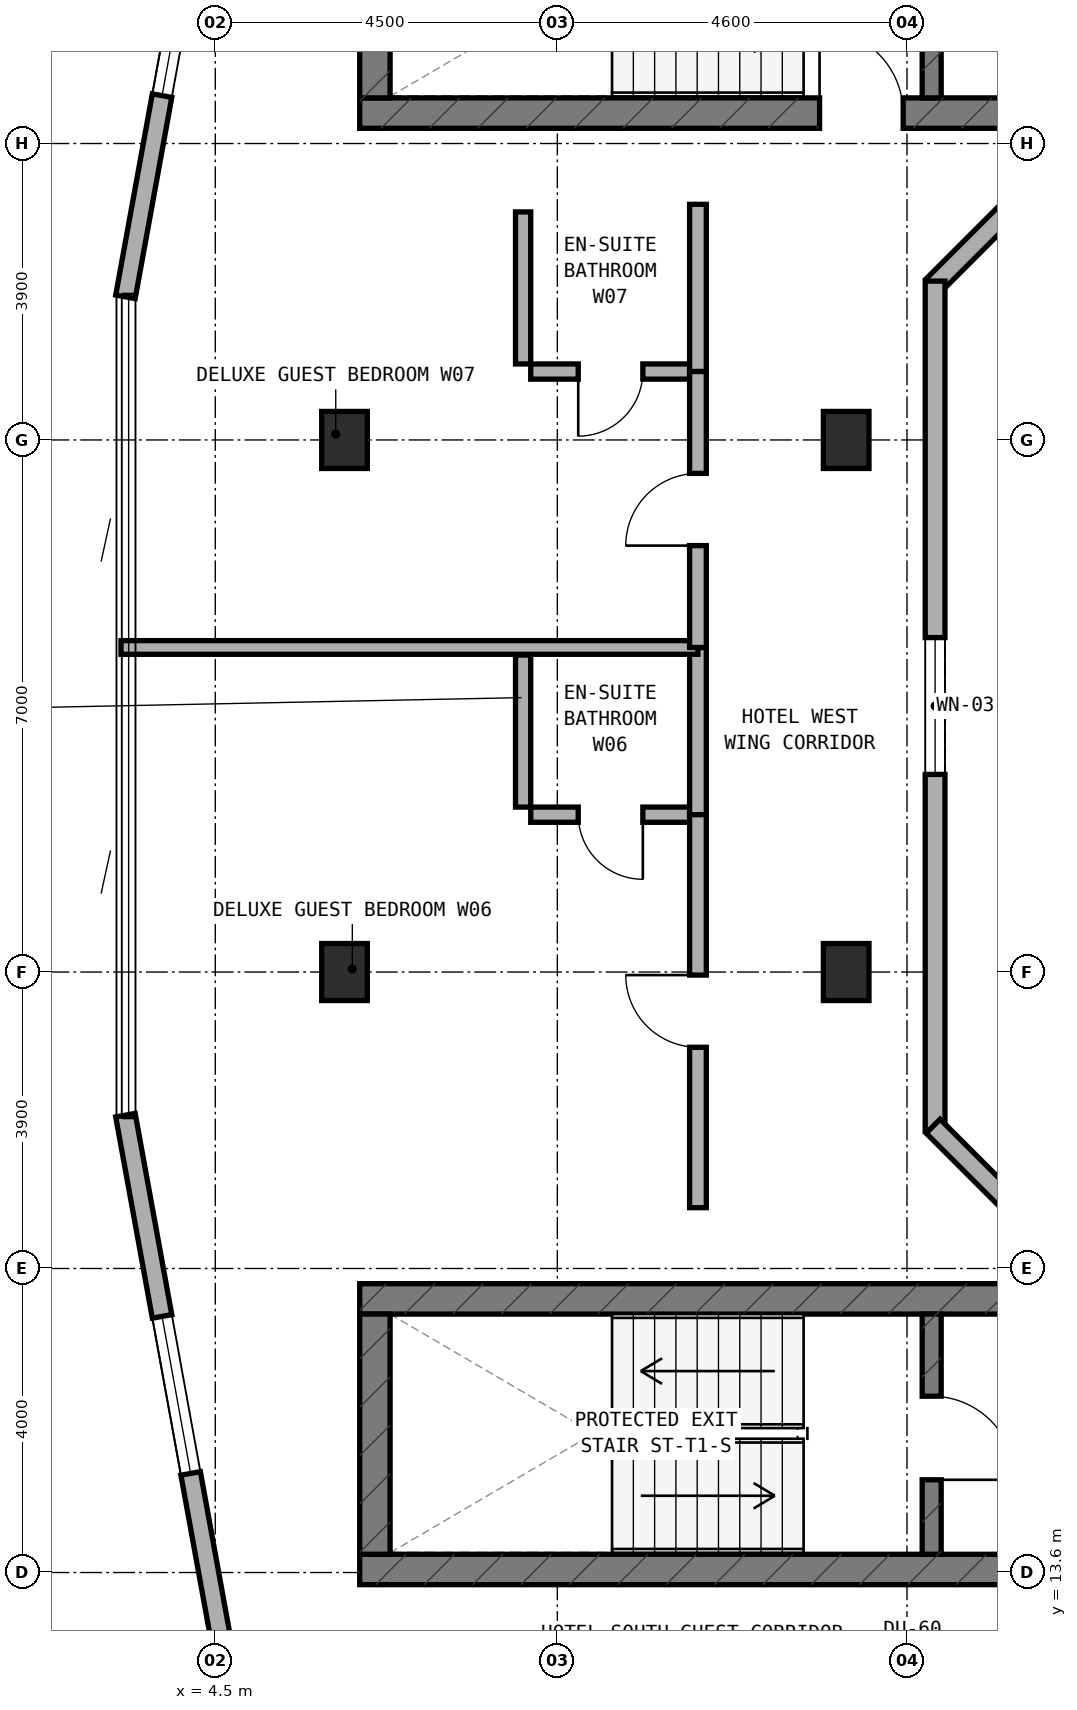
"""IFC4 building model, lengths in metres.
Left out: names, types, materials, properties, quantities, classifications, styles, units other than length and angle.
Written with IfcOpenShell. Run it as: python <this file> out.ifc"""

import sys

from ifc_helpers import new_model, si_unit, direction, frame, frame_2d, origin, origin_2d, place, context, subcontext, project, spatial, rectangle, extrude, element, fill, save


model = new_model("IFC4")
c1 = context("Model", 3, precision=1e-05, world=origin(), true_north=direction((0.0, 1.0)))
c2 = subcontext(c1, "Body", "Model", "MODEL_VIEW")
j1 = project(units=[si_unit("LENGTHUNIT", "METRE"), si_unit("PLANEANGLEUNIT", "RADIAN")], contexts=[c1])
p1 = place(None, origin())
s1 = spatial("IfcSite", under=j1, at=p1, CompositionType="ELEMENT")
p2 = place(p1, origin())
s2 = spatial("IfcBuilding", under=s1, at=p2, CompositionType="ELEMENT")
p3 = place(p2, frame((0.0, 0.0, 250.4)))
s3 = spatial("IfcBuildingStorey", under=s2, at=p3, CompositionType="ELEMENT", Elevation=250.4)
p4 = place(p3, frame((6.4, 32.8, 0.0), z_axis=(0.0, 0.0, 1.0), x_axis=(1.0, 0.0, 0.0)))
e1 = element("IfcWall", 1, at=p4, inside=s3, PredefinedType="SHEAR", context=c2, shape_type="SweptSolid", body=[
    extrude(rectangle(XDim=24.4, YDim=0.4, at=frame_2d((12.2, 0.0))), origin(), (0.0, 0.0, 1.0), 3.6),
])
p5 = place(p4, frame((6.05, 0.0, 0.0)))
e2 = element("IfcOpeningElement", 2, at=p5, cuts=e1, PredefinedType="OPENING", context=c2, shape_type="SweptSolid", body=[
    extrude(rectangle(XDim=1.1, YDim=2.15, at=frame_2d((0.55, 1.075))), frame((0.0, 0.21, 0.0), z_axis=(0.0, -1.0, 0.0), x_axis=(1.0, 0.0, 0.0)), (0.0, 0.0, 1.0), 0.42),
])
p6 = place(p3, frame((6.6, 33.0, 0.0), z_axis=(0.0, 0.0, 1.0), x_axis=(0.0, 1.0, 0.0)))
e3 = element("IfcWall", 3, at=p6, inside=s3, PredefinedType="SHEAR", context=c2, shape_type="SweptSolid", body=[
    extrude(rectangle(XDim=3.16, YDim=0.4, at=frame_2d((1.58, 0.0))), origin(), (0.0, 0.0, 1.0), 3.6),
])
p7 = place(p3, frame((13.925, 33.0, 0.0), z_axis=(0.0, 0.0, 1.0), x_axis=(0.0, 1.0, 0.0)))
e4 = element("IfcWall", 4, at=p7, inside=s3, PredefinedType="STANDARD", context=c2, shape_type="SweptSolid", body=[
    extrude(rectangle(XDim=3.16, YDim=0.25, at=frame_2d((1.58, 0.0))), origin(), (0.0, 0.0, 1.0), 3.32),
])
p8 = place(p7, frame((0.98, 0.0, 0.0)))
e5 = element("IfcOpeningElement", 5, at=p8, cuts=e4, PredefinedType="OPENING", context=c2, shape_type="SweptSolid", body=[
    extrude(rectangle(XDim=1.1, YDim=2.15, at=frame_2d((0.55, 1.075))), frame((0.0, 0.135, 0.0), z_axis=(0.0, -1.0, 0.0), x_axis=(1.0, 0.0, 0.0)), (0.0, 0.0, 1.0), 0.27),
])
p9 = place(p3, frame((6.4, 13.64, 0.0), z_axis=(0.0, 0.0, 1.0), x_axis=(1.0, 0.0, 0.0)))
e6 = element("IfcWall", 6, at=p9, inside=s3, PredefinedType="SHEAR", context=c2, shape_type="SweptSolid", body=[
    extrude(rectangle(XDim=24.4, YDim=0.4, at=frame_2d((12.2, 0.0))), origin(), (0.0, 0.0, 1.0), 3.6),
])
p10 = place(p9, frame((9.15, 0.0, 0.0)))
e7 = element("IfcOpeningElement", 7, at=p10, cuts=e6, PredefinedType="OPENING", context=c2, shape_type="SweptSolid", body=[
    extrude(rectangle(XDim=1.2, YDim=2.15, at=frame_2d((0.6, 1.075))), frame((0.0, 0.21, 0.0), z_axis=(0.0, -1.0, 0.0), x_axis=(1.0, 0.0, 0.0)), (0.0, 0.0, 1.0), 0.42),
])
p11 = place(p9, frame((16.94, 0.0, 0.0)))
e8 = element("IfcOpeningElement", 8, at=p11, cuts=e6, PredefinedType="OPENING", context=c2, shape_type="SweptSolid", body=[
    extrude(rectangle(XDim=0.85, YDim=2.1, at=frame_2d((0.425, 1.05))), frame((0.0, 0.21, 0.0), z_axis=(0.0, -1.0, 0.0), x_axis=(1.0, 0.0, 0.0)), (0.0, 0.0, 1.0), 0.42),
])
p12 = place(p9, frame((18.783, 0.0, 0.0)))
e9 = element("IfcOpeningElement", 9, at=p12, cuts=e6, PredefinedType="OPENING", context=c2, shape_type="SweptSolid", body=[
    extrude(rectangle(XDim=1.1, YDim=2.15, at=frame_2d((0.55, 1.075))), frame((0.0, 0.21, 0.0), z_axis=(0.0, -1.0, 0.0), x_axis=(1.0, 0.0, 0.0)), (0.0, 0.0, 1.0), 0.42),
])
p13 = place(p9, frame((20.65, 0.0, 0.0)))
e10 = element("IfcOpeningElement", 10, at=p13, cuts=e6, PredefinedType="OPENING", context=c2, shape_type="SweptSolid", body=[
    extrude(rectangle(XDim=1.1, YDim=2.15, at=frame_2d((0.55, 1.075))), frame((0.0, 0.21, 0.0), z_axis=(0.0, -1.0, 0.0), x_axis=(1.0, 0.0, 0.0)), (0.0, 0.0, 1.0), 0.42),
])
p14 = place(p9, frame((22.517, 0.0, 0.0)))
e11 = element("IfcOpeningElement", 11, at=p14, cuts=e6, PredefinedType="OPENING", context=c2, shape_type="SweptSolid", body=[
    extrude(rectangle(XDim=1.1, YDim=2.15, at=frame_2d((0.55, 1.075))), frame((0.0, 0.21, 0.0), z_axis=(0.0, -1.0, 0.0), x_axis=(1.0, 0.0, 0.0)), (0.0, 0.0, 1.0), 0.42),
])
p15 = place(p3, frame((6.4, 17.2, 0.0), z_axis=(0.0, 0.0, 1.0), x_axis=(1.0, 0.0, 0.0)))
e12 = element("IfcWall", 12, at=p15, inside=s3, PredefinedType="SHEAR", context=c2, shape_type="SweptSolid", body=[
    extrude(rectangle(XDim=24.4, YDim=0.4, at=frame_2d((12.2, 0.0))), origin(), (0.0, 0.0, 1.0), 3.6),
])
p16 = place(p3, frame((6.6, 13.84, 0.0), z_axis=(0.0, 0.0, 1.0), x_axis=(0.0, 1.0, 0.0)))
e13 = element("IfcWall", 13, at=p16, inside=s3, PredefinedType="SHEAR", context=c2, shape_type="SweptSolid", body=[
    extrude(rectangle(XDim=3.16, YDim=0.4, at=frame_2d((1.58, 0.0))), origin(), (0.0, 0.0, 1.0), 3.6),
])
p17 = place(p3, frame((13.925, 13.84, 0.0), z_axis=(0.0, 0.0, 1.0), x_axis=(0.0, 1.0, 0.0)))
e14 = element("IfcWall", 14, at=p17, inside=s3, PredefinedType="STANDARD", context=c2, shape_type="SweptSolid", body=[
    extrude(rectangle(XDim=3.16, YDim=0.25, at=frame_2d((1.58, 0.0))), origin(), (0.0, 0.0, 1.0), 3.32),
])
p18 = place(p17, frame((0.98, 0.0, 0.0)))
e15 = element("IfcOpeningElement", 15, at=p18, cuts=e14, PredefinedType="OPENING", context=c2, shape_type="SweptSolid", body=[
    extrude(rectangle(XDim=1.1, YDim=2.15, at=frame_2d((0.55, 1.075))), frame((0.0, 0.135, 0.0), z_axis=(0.0, -1.0, 0.0), x_axis=(1.0, 0.0, 0.0)), (0.0, 0.0, 1.0), 0.27),
])
for number, where, z_axis, x_axis in (
    (16, (6.2, 21.5, 0.0), (0.0, 0.0, 1.0), (1.0, 0.0, 0.0)),
    (17, (6.2, 28.5, 0.0), (0.0, 0.0, 1.0), (1.0, 0.0, 0.0)),
    (18, (12.8, 21.5, 0.0), (0.0, 0.0, 1.0), (1.0, 0.0, 0.0)),
    (19, (12.8, 28.5, 0.0), (0.0, 0.0, 1.0), (1.0, 0.0, 0.0)),
):
    element("IfcColumn", number, at=place(p3, frame(where, z_axis=z_axis, x_axis=x_axis)), inside=s3, PredefinedType="COLUMN", context=c2, shape_type="SweptSolid", body=[
        extrude(rectangle(XDim=0.6, YDim=0.75, at=origin_2d()), origin(), (0.0, 0.0, 1.0), 3.6),
    ])
p19 = place(p3, frame((4.829, 38.685, 0.0), z_axis=(0.0, 0.0, 1.0), x_axis=(-0.179061111398, -0.983837953316, 0.0)))
e20 = element("IfcWall", 20, at=p19, inside=s3, PredefinedType="STANDARD", context=c2, shape_type="SweptSolid", body=[
    extrude(rectangle(XDim=8.438, YDim=0.26, at=frame_2d((4.219, 0.0))), origin(), (0.0, 0.0, 1.0), 3.32),
])
p20 = place(p19, frame((3.648, 0.0, 0.85)))
e21 = element("IfcOpeningElement", 21, at=p20, cuts=e20, PredefinedType="OPENING", context=c2, shape_type="SweptSolid", body=[
    extrude(rectangle(XDim=2.1, YDim=1.5, at=frame_2d((1.05, 0.75))), frame((0.0, 0.14, 0.0), z_axis=(0.0, -1.0, 0.0), x_axis=(1.0, 0.0, 0.0)), (0.0, 0.0, 1.0), 0.28),
])
p21 = place(p3, frame((3.318, 19.617, 0.0), z_axis=(0.0, 0.0, 1.0), x_axis=(0.179061111398, -0.983837953316, 0.0)))
e22 = element("IfcWall", 22, at=p21, inside=s3, PredefinedType="STANDARD", context=c2, shape_type="SweptSolid", body=[
    extrude(rectangle(XDim=8.438, YDim=0.26, at=frame_2d((4.219, 0.0))), origin(), (0.0, 0.0, 1.0), 3.32),
])
p22 = place(p21, frame((2.691, 0.0, 0.85)))
e23 = element("IfcOpeningElement", 23, at=p22, cuts=e22, PredefinedType="OPENING", context=c2, shape_type="SweptSolid", body=[
    extrude(rectangle(XDim=2.1, YDim=1.5, at=frame_2d((1.05, 0.75))), frame((0.0, 0.14, 0.0), z_axis=(0.0, -1.0, 0.0), x_axis=(1.0, 0.0, 0.0)), (0.0, 0.0, 1.0), 0.28),
])
p23 = place(p3, frame((15.578, 32.162, 0.0), z_axis=(0.0, 0.0, 1.0), x_axis=(-0.707053950914, -0.707159607512, 0.0)))
e24 = element("IfcWall", 24, at=p23, inside=s3, PredefinedType="STANDARD", context=c2, shape_type="SweptSolid", body=[
    extrude(rectangle(XDim=2.311, YDim=0.26, at=frame_2d((1.155, 0.0))), origin(), (0.0, 0.0, 1.0), 3.32),
])
p24 = place(p3, frame((13.97, 30.59, 0.0), z_axis=(0.0, 0.0, 1.0), x_axis=(0.0, -1.0, 0.0)))
e25 = element("IfcWall", 25, at=p24, inside=s3, PredefinedType="STANDARD", context=c2, shape_type="SweptSolid", body=[
    extrude(rectangle(XDim=11.18, YDim=0.26, at=frame_2d((5.59, 0.0))), origin(), (0.0, 0.0, 1.0), 3.32),
])
p25 = place(p24, frame((4.69, 0.0, 0.85)))
e26 = element("IfcOpeningElement", 26, at=p25, cuts=e25, PredefinedType="OPENING", context=c2, shape_type="SweptSolid", body=[
    extrude(rectangle(XDim=1.8, YDim=1.5, at=frame_2d((0.9, 0.75))), frame((0.0, 0.14, 0.0), z_axis=(0.0, -1.0, 0.0), x_axis=(1.0, 0.0, 0.0)), (0.0, 0.0, 1.0), 0.28),
])
p26 = place(p3, frame((13.944, 19.472, 0.0), z_axis=(0.0, 0.0, 1.0), x_axis=(0.707053950914, -0.707159607512, 0.0)))
e27 = element("IfcWall", 27, at=p26, inside=s3, PredefinedType="STANDARD", context=c2, shape_type="SweptSolid", body=[
    extrude(rectangle(XDim=2.311, YDim=0.26, at=frame_2d((1.155, 0.0))), origin(), (0.0, 0.0, 1.0), 3.32),
])
p27 = place(p3, frame((8.65, 23.57, 0.0), z_axis=(0.0, 0.0, 1.0), x_axis=(1.0, 0.0, 0.0)))
e28 = element("IfcWall", 28, at=p27, inside=s3, PredefinedType="PLUMBINGWALL", context=c2, shape_type="SweptSolid", body=[
    extrude(rectangle(XDim=2.1, YDim=0.2, at=frame_2d((1.05, 0.0))), origin(), (0.0, 0.0, 1.0), 3.32),
])
p28 = place(p27, frame((0.625, 0.0, 0.0)))
e29 = element("IfcOpeningElement", 29, at=p28, cuts=e28, PredefinedType="OPENING", context=c2, shape_type="SweptSolid", body=[
    extrude(rectangle(XDim=0.85, YDim=2.1, at=frame_2d((0.425, 1.05))), frame((0.0, 0.11, 0.0), z_axis=(0.0, -1.0, 0.0), x_axis=(1.0, 0.0, 0.0)), (0.0, 0.0, 1.0), 0.22),
])
p29 = place(p3, frame((8.55, 23.67, 0.0), z_axis=(0.0, 0.0, 1.0), x_axis=(0.0, 1.0, 0.0)))
e30 = element("IfcWall", 30, at=p29, inside=s3, PredefinedType="PLUMBINGWALL", context=c2, shape_type="SweptSolid", body=[
    extrude(rectangle(XDim=2.0, YDim=0.2, at=frame_2d((1.0, 0.0))), origin(), (0.0, 0.0, 1.0), 3.32),
])
p30 = place(p3, frame((10.85, 23.57, 0.0), z_axis=(0.0, 0.0, 1.0), x_axis=(0.0, 1.0, 0.0)))
e31 = element("IfcWall", 31, at=p30, inside=s3, PredefinedType="SOLIDWALL", context=c2, shape_type="SweptSolid", body=[
    extrude(rectangle(XDim=2.2, YDim=0.22, at=frame_2d((1.1, 0.0))), origin(), (0.0, 0.0, 1.0), 3.32),
])
p31 = place(p3, frame((10.85, 18.4, 0.0), z_axis=(0.0, 0.0, 1.0), x_axis=(0.0, 1.0, 0.0)))
e32 = element("IfcWall", 32, at=p31, inside=s3, PredefinedType="SOLIDWALL", context=c2, shape_type="SweptSolid", body=[
    extrude(rectangle(XDim=5.17, YDim=0.22, at=frame_2d((2.585, 0.0))), origin(), (0.0, 0.0, 1.0), 2.745),
])
p32 = place(p31, frame((2.11, 0.0, 0.0)))
e33 = element("IfcOpeningElement", 33, at=p32, cuts=e32, PredefinedType="OPENING", context=c2, shape_type="SweptSolid", body=[
    extrude(rectangle(XDim=0.95, YDim=2.1, at=frame_2d((0.475, 1.05))), frame((0.0, 0.12, 0.0), z_axis=(0.0, -1.0, 0.0), x_axis=(1.0, 0.0, 0.0)), (0.0, 0.0, 1.0), 0.24),
])
p33 = place(p3, frame((3.26, 25.77, 0.0), z_axis=(0.0, 0.0, 1.0), x_axis=(1.0, 0.0, 0.0)))
e34 = element("IfcWall", 34, at=p33, inside=s3, PredefinedType="SOLIDWALL", context=c2, shape_type="SweptSolid", body=[
    extrude(rectangle(XDim=7.59, YDim=0.18, at=frame_2d((3.795, 0.0))), origin(), (0.0, 0.0, 1.0), 3.015),
])
p34 = place(p3, frame((8.65, 29.4, 0.0), z_axis=(0.0, 0.0, 1.0), x_axis=(1.0, 0.0, 0.0)))
e35 = element("IfcWall", 35, at=p34, inside=s3, PredefinedType="PLUMBINGWALL", context=c2, shape_type="SweptSolid", body=[
    extrude(rectangle(XDim=2.1, YDim=0.2, at=frame_2d((1.05, 0.0))), origin(), (0.0, 0.0, 1.0), 3.32),
])
p35 = place(p34, frame((0.625, 0.0, 0.0)))
e36 = element("IfcOpeningElement", 36, at=p35, cuts=e35, PredefinedType="OPENING", context=c2, shape_type="SweptSolid", body=[
    extrude(rectangle(XDim=0.85, YDim=2.1, at=frame_2d((0.425, 1.05))), frame((0.0, 0.11, 0.0), z_axis=(0.0, -1.0, 0.0), x_axis=(1.0, 0.0, 0.0)), (0.0, 0.0, 1.0), 0.22),
])
p36 = place(p3, frame((8.55, 29.5, 0.0), z_axis=(0.0, 0.0, 1.0), x_axis=(0.0, 1.0, 0.0)))
e37 = element("IfcWall", 37, at=p36, inside=s3, PredefinedType="PLUMBINGWALL", context=c2, shape_type="SweptSolid", body=[
    extrude(rectangle(XDim=2.0, YDim=0.2, at=frame_2d((1.0, 0.0))), origin(), (0.0, 0.0, 1.0), 3.32),
])
p37 = place(p3, frame((10.85, 29.4, 0.0), z_axis=(0.0, 0.0, 1.0), x_axis=(0.0, 1.0, 0.0)))
e38 = element("IfcWall", 38, at=p37, inside=s3, PredefinedType="SOLIDWALL", context=c2, shape_type="SweptSolid", body=[
    extrude(rectangle(XDim=2.2, YDim=0.22, at=frame_2d((1.1, 0.0))), origin(), (0.0, 0.0, 1.0), 3.32),
])
p38 = place(p3, frame((10.85, 25.77, 0.0), z_axis=(0.0, 0.0, 1.0), x_axis=(0.0, 1.0, 0.0)))
e39 = element("IfcWall", 39, at=p38, inside=s3, PredefinedType="SOLIDWALL", context=c2, shape_type="SweptSolid", body=[
    extrude(rectangle(XDim=3.63, YDim=0.22, at=frame_2d((1.815, 0.0))), origin(), (0.0, 0.0, 1.0), 2.745),
])
p39 = place(p38, frame((1.34, 0.0, 0.0)))
e40 = element("IfcOpeningElement", 40, at=p39, cuts=e39, PredefinedType="OPENING", context=c2, shape_type="SweptSolid", body=[
    extrude(rectangle(XDim=0.95, YDim=2.1, at=frame_2d((0.475, 1.05))), frame((0.0, 0.12, 0.0), z_axis=(0.0, -1.0, 0.0), x_axis=(1.0, 0.0, 0.0)), (0.0, 0.0, 1.0), 0.24),
])
p40 = place(p20, origin())
e41 = element("IfcWindow", 41, at=p40, inside=s3, PartitioningType="SINGLE_PANEL", PredefinedType="WINDOW", context=c2, shape_type="SweptSolid", body=[
    extrude(rectangle(XDim=2.1, YDim=1.5, at=frame_2d((1.05, 0.75))), frame((0.0, 0.03, 0.0), z_axis=(0.0, -1.0, 0.0), x_axis=(1.0, 0.0, 0.0)), (0.0, 0.0, 1.0), 0.06),
])
fill(e21, e41)
p41 = place(p22, origin())
e42 = element("IfcWindow", 42, at=p41, inside=s3, PartitioningType="SINGLE_PANEL", PredefinedType="WINDOW", context=c2, shape_type="SweptSolid", body=[
    extrude(rectangle(XDim=2.1, YDim=1.5, at=frame_2d((1.05, 0.75))), frame((0.0, 0.03, 0.0), z_axis=(0.0, -1.0, 0.0), x_axis=(1.0, 0.0, 0.0)), (0.0, 0.0, 1.0), 0.06),
])
fill(e23, e42)
p42 = place(p25, origin())
e43 = element("IfcWindow", 43, at=p42, inside=s3, PartitioningType="SINGLE_PANEL", PredefinedType="WINDOW", context=c2, shape_type="SweptSolid", body=[
    extrude(rectangle(XDim=1.8, YDim=1.5, at=frame_2d((0.9, 0.75))), frame((0.0, 0.03, 0.0), z_axis=(0.0, -1.0, 0.0), x_axis=(1.0, 0.0, 0.0)), (0.0, 0.0, 1.0), 0.06),
])
fill(e26, e43)
p43 = place(p18, frame((1.1, 0.0, 0.0), z_axis=(0.0, 0.0, 1.0), x_axis=(-1.0, 0.0, 0.0)))
e44 = element("IfcDoor", 44, at=p43, inside=s3, OperationType="SINGLE_SWING_RIGHT", PredefinedType="DOOR", context=c2, shape_type="SweptSolid", body=[
    extrude(rectangle(XDim=1.1, YDim=2.15, at=frame_2d((0.55, 1.075))), frame((0.0, 0.025, 0.0), z_axis=(0.0, -1.0, 0.0), x_axis=(1.0, 0.0, 0.0)), (0.0, 0.0, 1.0), 0.05),
])
fill(e15, e44)
p44 = place(p5, origin())
e45 = element("IfcDoor", 45, at=p44, inside=s3, OperationType="SINGLE_SWING_LEFT", PredefinedType="DOOR", context=c2, shape_type="SweptSolid", body=[
    extrude(rectangle(XDim=1.1, YDim=2.15, at=frame_2d((0.55, 1.075))), frame((0.0, 0.025, 0.0), z_axis=(0.0, -1.0, 0.0), x_axis=(1.0, 0.0, 0.0)), (0.0, 0.0, 1.0), 0.05),
])
fill(e2, e45)
p45 = place(p28, frame((0.85, 0.0, 0.0), z_axis=(0.0, 0.0, 1.0), x_axis=(-1.0, 0.0, 0.0)))
e46 = element("IfcDoor", 46, at=p45, inside=s3, OperationType="SINGLE_SWING_LEFT", PredefinedType="DOOR", context=c2, shape_type="SweptSolid", body=[
    extrude(rectangle(XDim=0.85, YDim=2.1, at=frame_2d((0.425, 1.05))), frame((0.0, 0.025, 0.0), z_axis=(0.0, -1.0, 0.0), x_axis=(1.0, 0.0, 0.0)), (0.0, 0.0, 1.0), 0.05),
])
fill(e29, e46)
p46 = place(p32, origin())
e47 = element("IfcDoor", 47, at=p46, inside=s3, OperationType="SINGLE_SWING_RIGHT", PredefinedType="DOOR", context=c2, shape_type="SweptSolid", body=[
    extrude(rectangle(XDim=0.95, YDim=2.1, at=frame_2d((0.475, 1.05))), frame((0.0, 0.025, 0.0), z_axis=(0.0, -1.0, 0.0), x_axis=(1.0, 0.0, 0.0)), (0.0, 0.0, 1.0), 0.05),
])
fill(e33, e47)
p47 = place(p35, frame((0.85, 0.0, 0.0), z_axis=(0.0, 0.0, 1.0), x_axis=(-1.0, 0.0, 0.0)))
e48 = element("IfcDoor", 48, at=p47, inside=s3, OperationType="SINGLE_SWING_RIGHT", PredefinedType="DOOR", context=c2, shape_type="SweptSolid", body=[
    extrude(rectangle(XDim=0.85, YDim=2.1, at=frame_2d((0.425, 1.05))), frame((0.0, 0.025, 0.0), z_axis=(0.0, -1.0, 0.0), x_axis=(1.0, 0.0, 0.0)), (0.0, 0.0, 1.0), 0.05),
])
fill(e36, e48)
p48 = place(p39, origin())
e49 = element("IfcDoor", 49, at=p48, inside=s3, OperationType="SINGLE_SWING_LEFT", PredefinedType="DOOR", context=c2, shape_type="SweptSolid", body=[
    extrude(rectangle(XDim=0.95, YDim=2.1, at=frame_2d((0.475, 1.05))), frame((0.0, 0.025, 0.0), z_axis=(0.0, -1.0, 0.0), x_axis=(1.0, 0.0, 0.0)), (0.0, 0.0, 1.0), 0.05),
])
fill(e40, e49)
save(model, sys.argv[1])
